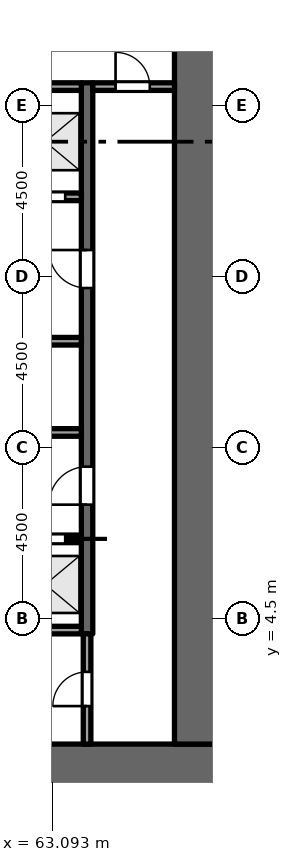
"""IFC4 building model, lengths in metres.
Left out: names, types, materials, properties, quantities, classifications, styles, units other than length and angle.
Written with IfcOpenShell. Run it as: python <this file> out.ifc"""

import sys

from ifc_helpers import new_model, si_unit, direction, frame, frame_2d, origin, place, context, subcontext, project, spatial, rectangle, extrude, element, fill, save


model = new_model("IFC4")
c1 = context("Model", 3, precision=1e-05, world=origin(), true_north=direction((0.0, 1.0)))
c2 = subcontext(c1, "Body", "Model", "MODEL_VIEW")
j1 = project(units=[si_unit("LENGTHUNIT", "METRE"), si_unit("PLANEANGLEUNIT", "RADIAN")], contexts=[c1])
p1 = place(None, origin())
s1 = spatial("IfcSite", under=j1, at=p1, CompositionType="ELEMENT")
p2 = place(p1, origin())
s2 = spatial("IfcBuilding", under=s1, at=p2, CompositionType="ELEMENT")
p3 = place(p2, origin())
s3 = spatial("IfcBuildingStorey", under=s2, at=p3, CompositionType="ELEMENT", Elevation=0.0)
p4 = place(p3, frame((67.5, 0.6, -0.3), z_axis=(0.0, 0.0, 1.0), x_axis=(-1.0, 0.0, 0.0)))
e1 = element("IfcWall", 1, at=p4, inside=s3, PredefinedType="SHEAR", context=c2, shape_type="SweptSolid", body=[
    extrude(rectangle(XDim=13.5, YDim=1.2, at=frame_2d((6.75, 0.0))), origin(), (0.0, 0.0, 1.0), 8.15),
])
p5 = place(p4, frame((11.05, 0.0, 0.3)))
e2 = element("IfcOpeningElement", 2, at=p5, cuts=e1, PredefinedType="OPENING", context=c2, shape_type="SweptSolid", body=[
    extrude(rectangle(XDim=1.1, YDim=2.1, at=frame_2d((0.55, 1.05))), frame((0.0, 0.61, 0.0), z_axis=(0.0, -1.0, 0.0), x_axis=(1.0, 0.0, 0.0)), (0.0, 0.0, 1.0), 1.22),
])
p6 = place(p3, frame((66.9, 1.2, -0.3), z_axis=(0.0, 0.0, 1.0), x_axis=(0.0, 1.0, 0.0)))
e3 = element("IfcWall", 3, at=p6, inside=s3, PredefinedType="SHEAR", context=c2, shape_type="SweptSolid", body=[
    extrude(rectangle(XDim=20.1, YDim=1.2, at=frame_2d((10.05, 0.0))), origin(), (0.0, 0.0, 1.0), 8.15),
])
p7 = place(p3, frame((64.0, 1.2, 0.0), z_axis=(0.0, 0.0, 1.0), x_axis=(0.0, 1.0, 0.0)))
e4 = element("IfcWall", 4, at=p7, inside=s3, PredefinedType="PARTITIONING", context=c2, shape_type="SweptSolid", body=[
    extrude(rectangle(XDim=2.9, YDim=0.2, at=frame_2d((1.45, 0.0))), origin(), (0.0, 0.0, 1.0), 7.75),
])
p8 = place(p7, frame((1.0, 0.0, 0.0)))
e5 = element("IfcOpeningElement", 5, at=p8, cuts=e4, PredefinedType="OPENING", context=c2, shape_type="SweptSolid", body=[
    extrude(rectangle(XDim=0.9, YDim=2.1, at=frame_2d((0.45, 1.05))), frame((0.0, 0.11, 0.0), z_axis=(0.0, -1.0, 0.0), x_axis=(1.0, 0.0, 0.0)), (0.0, 0.0, 1.0), 0.22),
])
p9 = place(p3, frame((64.0, 4.1, 0.0), z_axis=(0.0, 0.0, 1.0), x_axis=(0.0, 1.0, 0.0)))
e6 = element("IfcWall", 6, at=p9, inside=s3, PredefinedType="SHEAR", context=c2, shape_type="SweptSolid", body=[
    extrude(rectangle(XDim=14.5, YDim=0.3, at=frame_2d((7.25, 0.0))), origin(), (0.0, 0.0, 1.0), 7.75),
])
p10 = place(p9, frame((3.4, 0.0, 0.0)))
e7 = element("IfcOpeningElement", 7, at=p10, cuts=e6, PredefinedType="OPENING", context=c2, shape_type="SweptSolid", body=[
    extrude(rectangle(XDim=1.0, YDim=2.1, at=frame_2d((0.5, 1.05))), frame((0.0, 0.16, 0.0), z_axis=(0.0, -1.0, 0.0), x_axis=(1.0, 0.0, 0.0)), (0.0, 0.0, 1.0), 0.32),
])
p11 = place(p9, frame((9.1, 0.0, 0.0)))
e8 = element("IfcOpeningElement", 8, at=p11, cuts=e6, PredefinedType="OPENING", context=c2, shape_type="SweptSolid", body=[
    extrude(rectangle(XDim=1.0, YDim=2.1, at=frame_2d((0.5, 1.05))), frame((0.0, 0.16, 0.0), z_axis=(0.0, -1.0, 0.0), x_axis=(1.0, 0.0, 0.0)), (0.0, 0.0, 1.0), 0.32),
])
p12 = place(p3, frame((61.9, 4.2, 0.0), z_axis=(0.0, 0.0, 1.0), x_axis=(1.0, 0.0, 0.0)))
e9 = element("IfcWall", 9, at=p12, inside=s3, PredefinedType="SOLIDWALL", context=c2, shape_type="SweptSolid", body=[
    extrude(rectangle(XDim=1.95, YDim=0.2, at=frame_2d((0.975, 0.0))), origin(), (0.0, 0.0, 1.0), 7.75),
])
p13 = place(p3, frame((61.9, 6.6, 0.0), z_axis=(0.0, 0.0, 1.0), x_axis=(1.0, 0.0, 0.0)))
e10 = element("IfcWall", 10, at=p13, inside=s3, PredefinedType="SOLIDWALL", context=c2, shape_type="SweptSolid", body=[
    extrude(rectangle(XDim=1.95, YDim=0.2, at=frame_2d((0.975, 0.0))), origin(), (0.0, 0.0, 1.0), 7.75),
])
p14 = place(p13, frame((0.425, 0.0, 0.012)))
e11 = element("IfcOpeningElement", 11, at=p14, cuts=e10, PredefinedType="OPENING", context=c2, shape_type="SweptSolid", body=[
    extrude(rectangle(XDim=1.1, YDim=2.1, at=frame_2d((0.55, 1.05))), frame((0.0, 0.11, 0.0), z_axis=(0.0, -1.0, 0.0), x_axis=(1.0, 0.0, 0.0)), (0.0, 0.0, 1.0), 0.22),
])
p15 = place(p3, frame((55.2, 9.4, 0.0), z_axis=(0.0, 0.0, 1.0), x_axis=(1.0, 0.0, 0.0)))
e12 = element("IfcWall", 12, at=p15, inside=s3, PredefinedType="PARTITIONING", context=c2, shape_type="SweptSolid", body=[
    extrude(rectangle(XDim=8.65, YDim=0.2, at=frame_2d((4.325, 0.0))), origin(), (0.0, 0.0, 1.0), 7.75),
])
p16 = place(p15, frame((3.875, 0.0, 0.0)))
e13 = element("IfcOpeningElement", 13, at=p16, cuts=e12, PredefinedType="OPENING", context=c2, shape_type="SweptSolid", body=[
    extrude(rectangle(XDim=0.9, YDim=2.1, at=frame_2d((0.45, 1.05))), frame((0.0, 0.11, 0.0), z_axis=(0.0, -1.0, 0.0), x_axis=(1.0, 0.0, 0.0)), (0.0, 0.0, 1.0), 0.22),
])
p17 = place(p3, frame((59.7, 11.8, 0.0), z_axis=(0.0, 0.0, 1.0), x_axis=(1.0, 0.0, 0.0)))
e14 = element("IfcWall", 14, at=p17, inside=s3, PredefinedType="PARTITIONING", context=c2, shape_type="SweptSolid", body=[
    extrude(rectangle(XDim=4.15, YDim=0.2, at=frame_2d((2.075, 0.0))), origin(), (0.0, 0.0, 1.0), 7.75),
])
p18 = place(p3, frame((61.9, 15.6, 0.0), z_axis=(0.0, 0.0, 1.0), x_axis=(1.0, 0.0, 0.0)))
e15 = element("IfcWall", 15, at=p18, inside=s3, PredefinedType="SOLIDWALL", context=c2, shape_type="SweptSolid", body=[
    extrude(rectangle(XDim=1.95, YDim=0.2, at=frame_2d((0.975, 0.0))), origin(), (0.0, 0.0, 1.0), 7.75),
])
p19 = place(p18, frame((0.425, 0.0, 0.012)))
e16 = element("IfcOpeningElement", 16, at=p19, cuts=e15, PredefinedType="OPENING", context=c2, shape_type="SweptSolid", body=[
    extrude(rectangle(XDim=1.1, YDim=2.1, at=frame_2d((0.55, 1.05))), frame((0.0, 0.11, 0.0), z_axis=(0.0, -1.0, 0.0), x_axis=(1.0, 0.0, 0.0)), (0.0, 0.0, 1.0), 0.22),
])
p20 = place(p3, frame((61.9, 18.5, 0.0), z_axis=(0.0, 0.0, 1.0), x_axis=(1.0, 0.0, 0.0)))
e17 = element("IfcWall", 17, at=p20, inside=s3, PredefinedType="SOLIDWALL", context=c2, shape_type="SweptSolid", body=[
    extrude(rectangle(XDim=1.95, YDim=0.2, at=frame_2d((0.975, 0.0))), origin(), (0.0, 0.0, 1.0), 7.75),
])
p21 = place(p3, frame((64.15, 18.5, 0.0), z_axis=(0.0, 0.0, 1.0), x_axis=(1.0, 0.0, 0.0)))
e18 = element("IfcWall", 18, at=p21, inside=s3, PredefinedType="PARTITIONING", context=c2, shape_type="SweptSolid", body=[
    extrude(rectangle(XDim=2.15, YDim=0.2, at=frame_2d((1.075, 0.0))), origin(), (0.0, 0.0, 1.0), 7.75),
])
p22 = place(p21, frame((0.6, 0.0, 0.0)))
e19 = element("IfcOpeningElement", 19, at=p22, cuts=e18, PredefinedType="OPENING", context=c2, shape_type="SweptSolid", body=[
    extrude(rectangle(XDim=0.9, YDim=2.1, at=frame_2d((0.45, 1.05))), frame((0.0, 0.11, 0.0), z_axis=(0.0, -1.0, 0.0), x_axis=(1.0, 0.0, 0.0)), (0.0, 0.0, 1.0), 0.22),
])
p23 = place(p14, origin())
e20 = element("IfcDoor", 20, at=p23, inside=s3, OperationType="SLIDING_TO_RIGHT", PredefinedType="DOOR", context=c2, shape_type="SweptSolid", body=[
    extrude(rectangle(XDim=1.1, YDim=2.1, at=frame_2d((0.55, 1.05))), frame((0.0, 0.025, 0.0), z_axis=(0.0, -1.0, 0.0), x_axis=(1.0, 0.0, 0.0)), (0.0, 0.0, 1.0), 0.05),
])
fill(e11, e20)
p24 = place(p19, origin())
e21 = element("IfcDoor", 21, at=p24, inside=s3, OperationType="SLIDING_TO_LEFT", PredefinedType="DOOR", context=c2, shape_type="SweptSolid", body=[
    extrude(rectangle(XDim=1.1, YDim=2.1, at=frame_2d((0.55, 1.05))), frame((0.0, 0.025, 0.0), z_axis=(0.0, -1.0, 0.0), x_axis=(1.0, 0.0, 0.0)), (0.0, 0.0, 1.0), 0.05),
])
fill(e16, e21)
p25 = place(p10, origin())
e22 = element("IfcDoor", 22, at=p25, inside=s3, OperationType="SINGLE_SWING_LEFT", PredefinedType="DOOR", context=c2, shape_type="SweptSolid", body=[
    extrude(rectangle(XDim=1.0, YDim=2.1, at=frame_2d((0.5, 1.05))), frame((0.0, 0.025, 0.0), z_axis=(0.0, -1.0, 0.0), x_axis=(1.0, 0.0, 0.0)), (0.0, 0.0, 1.0), 0.05),
])
fill(e7, e22)
p26 = place(p11, origin())
e23 = element("IfcDoor", 23, at=p26, inside=s3, OperationType="SINGLE_SWING_RIGHT", PredefinedType="DOOR", context=c2, shape_type="SweptSolid", body=[
    extrude(rectangle(XDim=1.0, YDim=2.1, at=frame_2d((0.5, 1.05))), frame((0.0, 0.025, 0.0), z_axis=(0.0, -1.0, 0.0), x_axis=(1.0, 0.0, 0.0)), (0.0, 0.0, 1.0), 0.05),
])
fill(e8, e23)
p27 = place(p8, origin())
e24 = element("IfcDoor", 24, at=p27, inside=s3, OperationType="SINGLE_SWING_LEFT", PredefinedType="DOOR", context=c2, shape_type="SweptSolid", body=[
    extrude(rectangle(XDim=0.9, YDim=2.1, at=frame_2d((0.45, 1.05))), frame((0.0, 0.025, 0.0), z_axis=(0.0, -1.0, 0.0), x_axis=(1.0, 0.0, 0.0)), (0.0, 0.0, 1.0), 0.05),
])
fill(e5, e24)
p28 = place(p22, origin())
e25 = element("IfcDoor", 25, at=p28, inside=s3, OperationType="SINGLE_SWING_LEFT", PredefinedType="DOOR", context=c2, shape_type="SweptSolid", body=[
    extrude(rectangle(XDim=0.9, YDim=2.1, at=frame_2d((0.45, 1.05))), frame((0.0, 0.025, 0.0), z_axis=(0.0, -1.0, 0.0), x_axis=(1.0, 0.0, 0.0)), (0.0, 0.0, 1.0), 0.05),
])
fill(e19, e25)
save(model, sys.argv[1])
